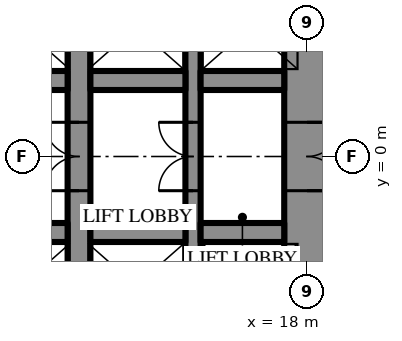
"""IFC4 building model, lengths in metres.
Left out: names, types, materials, properties, quantities, classifications, styles, units other than length and angle.
Written with IfcOpenShell. Run it as: python <this file> out.ifc"""

import sys

from ifc_helpers import new_model, si_unit, direction, frame, frame_2d, origin, place, context, subcontext, project, spatial, rectangle, extrude, element, fill, save


model = new_model("IFC4")
c1 = context("Model", 3, precision=1e-05, world=origin(), true_north=direction((0.0, 1.0)))
c2 = subcontext(c1, "Body", "Model", "MODEL_VIEW")
j1 = project(units=[si_unit("LENGTHUNIT", "METRE"), si_unit("PLANEANGLEUNIT", "RADIAN")], contexts=[c1])
p1 = place(None, origin())
s1 = spatial("IfcSite", under=j1, at=p1, CompositionType="ELEMENT")
p2 = place(p1, origin())
s2 = spatial("IfcBuilding", under=s1, at=p2, CompositionType="ELEMENT")
p3 = place(p2, frame((0.0, 0.0, 90.7)))
s3 = spatial("IfcBuildingStorey", under=s2, at=p3, CompositionType="ELEMENT", Elevation=90.7)
p4 = place(p3, frame((18.0, -10.7, 0.0), z_axis=(0.0, 0.0, 1.0), x_axis=(0.0, 1.0, 0.0)))
e1 = element("IfcWall", 1, at=p4, inside=s3, PredefinedType="SHEAR", context=c2, shape_type="SweptSolid", body=[
    extrude(rectangle(XDim=21.4, YDim=1.2, at=frame_2d((10.7, 0.0))), origin(), (0.0, 0.0, 1.0), 4.2),
])
p5 = place(p4, frame((9.8, 0.0, 0.0)))
e2 = element("IfcOpeningElement", 2, at=p5, cuts=e1, PredefinedType="OPENING", context=c2, shape_type="SweptSolid", body=[
    extrude(rectangle(XDim=1.8, YDim=2.4, at=frame_2d((0.9, 1.2))), frame((0.0, 0.61, 0.0), z_axis=(0.0, -1.0, 0.0), x_axis=(1.0, 0.0, 0.0)), (0.0, 0.0, 1.0), 1.22),
])
p6 = place(p3, frame((12.0, -10.7, 0.0), z_axis=(0.0, 0.0, 1.0), x_axis=(0.0, 1.0, 0.0)))
e3 = element("IfcWall", 3, at=p6, inside=s3, PredefinedType="SHEAR", context=c2, shape_type="SweptSolid", body=[
    extrude(rectangle(XDim=21.4, YDim=0.6, at=frame_2d((10.7, 0.0))), origin(), (0.0, 0.0, 1.0), 4.2),
])
p7 = place(p6, frame((9.8, 0.0, 0.0)))
e4 = element("IfcOpeningElement", 4, at=p7, cuts=e3, PredefinedType="OPENING", context=c2, shape_type="SweptSolid", body=[
    extrude(rectangle(XDim=1.8, YDim=2.4, at=frame_2d((0.9, 1.2))), frame((0.0, 0.31, 0.0), z_axis=(0.0, -1.0, 0.0), x_axis=(1.0, 0.0, 0.0)), (0.0, 0.0, 1.0), 0.62),
])
p8 = place(p3, frame((15.0, -10.7, 0.0), z_axis=(0.0, 0.0, 1.0), x_axis=(0.0, 1.0, 0.0)))
e5 = element("IfcWall", 5, at=p8, inside=s3, PredefinedType="SHEAR", context=c2, shape_type="SweptSolid", body=[
    extrude(rectangle(XDim=21.4, YDim=0.4, at=frame_2d((10.7, 0.0))), origin(), (0.0, 0.0, 1.0), 4.2),
])
p9 = place(p8, frame((9.8, 0.0, 0.0)))
e6 = element("IfcOpeningElement", 6, at=p9, cuts=e5, PredefinedType="OPENING", context=c2, shape_type="SweptSolid", body=[
    extrude(rectangle(XDim=1.8, YDim=2.4, at=frame_2d((0.9, 1.2))), frame((0.0, 0.21, 0.0), z_axis=(0.0, -1.0, 0.0), x_axis=(1.0, 0.0, 0.0)), (0.0, 0.0, 1.0), 0.42),
])
p10 = place(p3, frame((-3.2, 2.0, 0.0), z_axis=(0.0, 0.0, 1.0), x_axis=(1.0, 0.0, 0.0)))
e7 = element("IfcWall", 7, at=p10, inside=s3, PredefinedType="SHEAR", context=c2, shape_type="SweptSolid", body=[
    extrude(rectangle(XDim=14.9, YDim=0.5, at=frame_2d((7.45, 0.0))), origin(), (0.0, 0.0, 1.0), 4.2),
])
p11 = place(p10, frame((1.15, 0.0, 0.0)))
e8 = element("IfcOpeningElement", 8, at=p11, cuts=e7, PredefinedType="OPENING", context=c2, shape_type="SweptSolid", body=[
    extrude(rectangle(XDim=1.1, YDim=2.2, at=frame_2d((0.55, 1.1))), frame((0.0, 0.26, 0.0), z_axis=(0.0, -1.0, 0.0), x_axis=(1.0, 0.0, 0.0)), (0.0, 0.0, 1.0), 0.52),
])
p12 = place(p10, frame((4.15, 0.0, 0.0)))
e9 = element("IfcOpeningElement", 9, at=p12, cuts=e7, PredefinedType="OPENING", context=c2, shape_type="SweptSolid", body=[
    extrude(rectangle(XDim=1.1, YDim=2.2, at=frame_2d((0.55, 1.1))), frame((0.0, 0.26, 0.0), z_axis=(0.0, -1.0, 0.0), x_axis=(1.0, 0.0, 0.0)), (0.0, 0.0, 1.0), 0.52),
])
p13 = place(p10, frame((7.15, 0.0, 0.0)))
e10 = element("IfcOpeningElement", 10, at=p13, cuts=e7, PredefinedType="OPENING", context=c2, shape_type="SweptSolid", body=[
    extrude(rectangle(XDim=1.1, YDim=2.2, at=frame_2d((0.55, 1.1))), frame((0.0, 0.26, 0.0), z_axis=(0.0, -1.0, 0.0), x_axis=(1.0, 0.0, 0.0)), (0.0, 0.0, 1.0), 0.52),
])
p14 = place(p10, frame((10.15, 0.0, 0.0)))
e11 = element("IfcOpeningElement", 11, at=p14, cuts=e7, PredefinedType="OPENING", context=c2, shape_type="SweptSolid", body=[
    extrude(rectangle(XDim=1.1, YDim=2.2, at=frame_2d((0.55, 1.1))), frame((0.0, 0.26, 0.0), z_axis=(0.0, -1.0, 0.0), x_axis=(1.0, 0.0, 0.0)), (0.0, 0.0, 1.0), 0.52),
])
p15 = place(p3, frame((12.3, 2.0, 0.0), z_axis=(0.0, 0.0, 1.0), x_axis=(1.0, 0.0, 0.0)))
e12 = element("IfcWall", 12, at=p15, inside=s3, PredefinedType="SHEAR", context=c2, shape_type="SweptSolid", body=[
    extrude(rectangle(XDim=2.5, YDim=0.5, at=frame_2d((1.25, 0.0))), origin(), (0.0, 0.0, 1.0), 4.2),
])
for number, where, z_axis, x_axis in (
    (13, (15.2, 2.0, 0.0), (0.0, 0.0, 1.0), (1.0, 0.0, 0.0)),
    (14, (17.4, -2.0, 0.0), (0.0, 0.0, 1.0), (-1.0, 0.0, 0.0)),
):
    element("IfcWall", number, at=place(p3, frame(where, z_axis=z_axis, x_axis=x_axis)), inside=s3, PredefinedType="SHEAR", context=c2, shape_type="SweptSolid", body=[
        extrude(rectangle(XDim=2.2, YDim=0.5, at=frame_2d((1.1, 0.0))), origin(), (0.0, 0.0, 1.0), 4.2),
    ])
p16 = place(p3, frame((14.8, -2.0, 0.0), z_axis=(0.0, 0.0, 1.0), x_axis=(-1.0, 0.0, 0.0)))
e15 = element("IfcWall", 15, at=p16, inside=s3, PredefinedType="SHEAR", context=c2, shape_type="SweptSolid", body=[
    extrude(rectangle(XDim=2.5, YDim=0.5, at=frame_2d((1.25, 0.0))), origin(), (0.0, 0.0, 1.0), 4.2),
])
p17 = place(p3, frame((11.7, -2.0, 0.0), z_axis=(0.0, 0.0, 1.0), x_axis=(-1.0, 0.0, 0.0)))
e16 = element("IfcWall", 16, at=p17, inside=s3, PredefinedType="SHEAR", context=c2, shape_type="SweptSolid", body=[
    extrude(rectangle(XDim=5.9, YDim=0.5, at=frame_2d((2.95, 0.0))), origin(), (0.0, 0.0, 1.0), 4.2),
])
p18 = place(p5, frame((1.8, 0.0, 0.0), z_axis=(0.0, 0.0, 1.0), x_axis=(-1.0, 0.0, 0.0)))
e17 = element("IfcDoor", 17, at=p18, inside=s3, OperationType="DOUBLE_DOOR_SINGLE_SWING", PredefinedType="DOOR", context=c2, shape_type="SweptSolid", body=[
    extrude(rectangle(XDim=1.8, YDim=2.4, at=frame_2d((0.9, 1.2))), frame((0.0, 0.025, 0.0), z_axis=(0.0, -1.0, 0.0), x_axis=(1.0, 0.0, 0.0)), (0.0, 0.0, 1.0), 0.05),
])
fill(e2, e17)
p19 = place(p7, origin())
e18 = element("IfcDoor", 18, at=p19, inside=s3, OperationType="DOUBLE_DOOR_SINGLE_SWING", PredefinedType="DOOR", context=c2, shape_type="SweptSolid", body=[
    extrude(rectangle(XDim=1.8, YDim=2.4, at=frame_2d((0.9, 1.2))), frame((0.0, 0.025, 0.0), z_axis=(0.0, -1.0, 0.0), x_axis=(1.0, 0.0, 0.0)), (0.0, 0.0, 1.0), 0.05),
])
fill(e4, e18)
p20 = place(p9, origin())
e19 = element("IfcDoor", 19, at=p20, inside=s3, OperationType="DOUBLE_DOOR_SINGLE_SWING", PredefinedType="DOOR", context=c2, shape_type="SweptSolid", body=[
    extrude(rectangle(XDim=1.8, YDim=2.4, at=frame_2d((0.9, 1.2))), frame((0.0, 0.025, 0.0), z_axis=(0.0, -1.0, 0.0), x_axis=(1.0, 0.0, 0.0)), (0.0, 0.0, 1.0), 0.05),
])
fill(e6, e19)
save(model, sys.argv[1])
